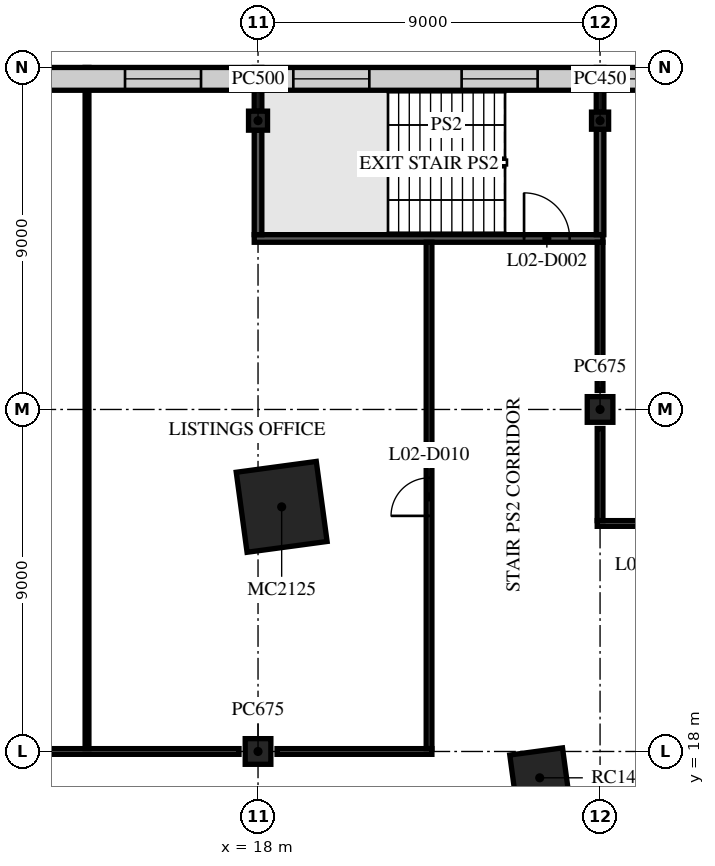
"""IFC4 building model, lengths in metres.
Left out: names, types, materials, properties, quantities, classifications, styles, units other than length and angle.
Written with IfcOpenShell. Run it as: python <this file> out.ifc"""

import sys

from ifc_helpers import new_model, si_unit, direction, frame, frame_2d, origin, origin_2d, place, context, subcontext, project, spatial, rectangle, extrude, element, fill, save


model = new_model("IFC4")
c1 = context("Model", 3, precision=1e-05, world=origin(), true_north=direction((0.0, 1.0)))
c2 = subcontext(c1, "Body", "Model", "MODEL_VIEW")
j1 = project(units=[si_unit("LENGTHUNIT", "METRE"), si_unit("PLANEANGLEUNIT", "RADIAN")], contexts=[c1])
p1 = place(None, origin())
s1 = spatial("IfcSite", under=j1, at=p1, CompositionType="ELEMENT")
p2 = place(p1, origin())
s2 = spatial("IfcBuilding", under=s1, at=p2, CompositionType="ELEMENT")
p3 = place(p2, frame((0.0, 0.0, 9.0)))
s3 = spatial("IfcBuildingStorey", under=s2, at=p3, CompositionType="ELEMENT", Elevation=9.0)
p4 = place(p3, frame((18.0, 18.0, 0.0), z_axis=(0.0, 0.0, 1.0), x_axis=(1.0, 0.0, 0.0)))
e1 = element("IfcColumn", 1, at=p4, inside=s3, PredefinedType="COLUMN", context=c2, shape_type="SweptSolid", body=[
    extrude(rectangle(XDim=0.675, YDim=0.675, at=origin_2d()), origin(), (0.0, 0.0, 1.0), 4.5),
])
p5 = place(p3, frame((18.0, 34.6, 0.0), z_axis=(0.0, 0.0, 1.0), x_axis=(1.0, 0.0, 0.0)))
e2 = element("IfcColumn", 2, at=p5, inside=s3, PredefinedType="COLUMN", context=c2, shape_type="SweptSolid", body=[
    extrude(rectangle(XDim=0.5, YDim=0.5, at=origin_2d()), origin(), (0.0, 0.0, 1.0), 4.5),
])
p6 = place(p3, frame((27.0, 27.0, 0.0), z_axis=(0.0, 0.0, 1.0), x_axis=(1.0, 0.0, 0.0)))
e3 = element("IfcColumn", 3, at=p6, inside=s3, PredefinedType="COLUMN", context=c2, shape_type="SweptSolid", body=[
    extrude(rectangle(XDim=0.675, YDim=0.675, at=origin_2d()), origin(), (0.0, 0.0, 1.0), 4.5),
])
p7 = place(p3, frame((27.0, 34.6, 0.0), z_axis=(0.0, 0.0, 1.0), x_axis=(1.0, 0.0, 0.0)))
e4 = element("IfcColumn", 4, at=p7, inside=s3, PredefinedType="COLUMN", context=c2, shape_type="SweptSolid", body=[
    extrude(rectangle(XDim=0.45, YDim=0.45, at=origin_2d()), origin(), (0.0, 0.0, 1.0), 4.5),
])
p8 = place(p3, frame((18.622, 24.437, 0.0), z_axis=(0.0, 0.0, 1.0), x_axis=(0.991001197216, 0.133853005627, 0.0)))
e5 = element("IfcColumn", 5, at=p8, inside=s3, PredefinedType="COLUMN", context=c2, shape_type="SweptSolid", body=[
    extrude(rectangle(XDim=2.125, YDim=2.125, at=origin_2d()), origin(), (0.0, 0.0, 1.0), 4.5),
])
p9 = place(p3, frame((25.412, 17.307, 0.0), z_axis=(0.0, 0.0, 1.0), x_axis=(0.991001197216, 0.133853005627, 0.0)))
e6 = element("IfcColumn", 6, at=p9, inside=s3, PredefinedType="COLUMN", context=c2, shape_type="SweptSolid", body=[
    extrude(rectangle(XDim=1.4, YDim=1.4, at=origin_2d()), origin(), (0.0, 0.0, 1.0), 4.5),
])
p10 = place(p3, frame((9.5, 18.0, 0.0), z_axis=(0.0, 0.0, 1.0), x_axis=(1.0, 0.0, 0.0)))
e7 = element("IfcWall", 7, at=p10, inside=s3, PredefinedType="PARTITIONING", context=c2, shape_type="SweptSolid", body=[
    extrude(rectangle(XDim=8.0, YDim=0.15, at=frame_2d((4.0, 0.0))), origin(), (0.0, 0.0, 1.0), 4.1),
])
p11 = place(p3, frame((18.5, 18.0, 0.0), z_axis=(0.0, 0.0, 1.0), x_axis=(1.0, 0.0, 0.0)))
e8 = element("IfcWall", 8, at=p11, inside=s3, PredefinedType="PARTITIONING", context=c2, shape_type="SweptSolid", body=[
    extrude(rectangle(XDim=4.075, YDim=0.15, at=frame_2d((2.038, 0.0))), origin(), (0.0, 0.0, 1.0), 4.1),
])
p12 = place(p3, frame((26.925, 24.0, 0.0), z_axis=(0.0, 0.0, 1.0), x_axis=(1.0, 0.0, 0.0)))
e9 = element("IfcWall", 9, at=p12, inside=s3, PredefinedType="PARTITIONING", context=c2, shape_type="SweptSolid", body=[
    extrude(rectangle(XDim=9.075, YDim=0.15, at=frame_2d((4.538, 0.0))), origin(), (0.0, 0.0, 1.0), 4.1),
])
p13 = place(p12, frame((1.075, 0.0, 0.0)))
e10 = element("IfcOpeningElement", 10, at=p13, cuts=e9, PredefinedType="OPENING", context=c2, shape_type="SweptSolid", body=[
    extrude(rectangle(XDim=0.9, YDim=2.1, at=frame_2d((0.45, 1.05))), frame((0.0, 0.085, 0.0), z_axis=(0.0, -1.0, 0.0), x_axis=(1.0, 0.0, 0.0)), (0.0, 0.0, 1.0), 0.17),
])
p14 = place(p12, frame((4.075, 0.0, 0.0)))
e11 = element("IfcOpeningElement", 11, at=p14, cuts=e9, PredefinedType="OPENING", context=c2, shape_type="SweptSolid", body=[
    extrude(rectangle(XDim=0.9, YDim=2.1, at=frame_2d((0.45, 1.05))), frame((0.0, 0.085, 0.0), z_axis=(0.0, -1.0, 0.0), x_axis=(1.0, 0.0, 0.0)), (0.0, 0.0, 1.0), 0.17),
])
p15 = place(p12, frame((7.075, 0.0, 0.0)))
e12 = element("IfcOpeningElement", 12, at=p15, cuts=e9, PredefinedType="OPENING", context=c2, shape_type="SweptSolid", body=[
    extrude(rectangle(XDim=0.9, YDim=2.1, at=frame_2d((0.45, 1.05))), frame((0.0, 0.085, 0.0), z_axis=(0.0, -1.0, 0.0), x_axis=(1.0, 0.0, 0.0)), (0.0, 0.0, 1.0), 0.17),
])
p16 = place(p3, frame((17.9, 31.5, 0.0), z_axis=(0.0, 0.0, 1.0), x_axis=(1.0, 0.0, 0.0)))
e13 = element("IfcWall", 13, at=p16, inside=s3, PredefinedType="PARTITIONING", context=c2, shape_type="SweptSolid", body=[
    extrude(rectangle(XDim=9.175, YDim=0.2, at=frame_2d((4.587, 0.0))), origin(), (0.0, 0.0, 1.0), 4.1),
])
p17 = place(p16, frame((7.1, 0.0, 0.0)))
e14 = element("IfcOpeningElement", 14, at=p17, cuts=e13, PredefinedType="OPENING", context=c2, shape_type="SweptSolid", body=[
    extrude(rectangle(XDim=1.2, YDim=2.1, at=frame_2d((0.6, 1.05))), frame((0.0, 0.11, 0.0), z_axis=(0.0, -1.0, 0.0), x_axis=(1.0, 0.0, 0.0)), (0.0, 0.0, 1.0), 0.22),
])
p18 = place(p3, frame((13.5, 18.075, 0.0), z_axis=(0.0, 0.0, 1.0), x_axis=(0.0, 1.0, 0.0)))
e15 = element("IfcWall", 15, at=p18, inside=s3, PredefinedType="PARTITIONING", context=c2, shape_type="SweptSolid", body=[
    extrude(rectangle(XDim=17.925, YDim=0.1, at=frame_2d((8.962, 0.0))), origin(), (0.0, 0.0, 1.0), 4.1),
])
p19 = place(p3, frame((18.0, 31.6, 0.0), z_axis=(0.0, 0.0, 1.0), x_axis=(0.0, 1.0, 0.0)))
e16 = element("IfcWall", 16, at=p19, inside=s3, PredefinedType="PARTITIONING", context=c2, shape_type="SweptSolid", body=[
    extrude(rectangle(XDim=2.75, YDim=0.2, at=frame_2d((1.375, 0.0))), origin(), (0.0, 0.0, 1.0), 4.1),
])
p20 = place(p3, frame((18.0, 34.85, 0.0), z_axis=(0.0, 0.0, 1.0), x_axis=(0.0, 1.0, 0.0)))
e17 = element("IfcWall", 17, at=p20, inside=s3, PredefinedType="PARTITIONING", context=c2, shape_type="SweptSolid", body=[
    extrude(rectangle(XDim=1.15, YDim=0.2, at=frame_2d((0.575, 0.0))), origin(), (0.0, 0.0, 1.0), 4.1),
])
p21 = place(p3, frame((22.5, 18.075, 0.0), z_axis=(0.0, 0.0, 1.0), x_axis=(0.0, 1.0, 0.0)))
e18 = element("IfcWall", 18, at=p21, inside=s3, PredefinedType="PARTITIONING", context=c2, shape_type="SweptSolid", body=[
    extrude(rectangle(XDim=13.325, YDim=0.15, at=frame_2d((6.663, 0.0))), origin(), (0.0, 0.0, 1.0), 4.1),
])
p22 = place(p21, frame((6.125, 0.0, 0.0)))
e19 = element("IfcOpeningElement", 19, at=p22, cuts=e18, PredefinedType="OPENING", context=c2, shape_type="SweptSolid", body=[
    extrude(rectangle(XDim=1.0, YDim=2.1, at=frame_2d((0.5, 1.05))), frame((0.0, 0.085, 0.0), z_axis=(0.0, -1.0, 0.0), x_axis=(1.0, 0.0, 0.0)), (0.0, 0.0, 1.0), 0.17),
])
p23 = place(p3, frame((27.0, 24.075, 0.0), z_axis=(0.0, 0.0, 1.0), x_axis=(0.0, 1.0, 0.0)))
e20 = element("IfcWall", 20, at=p23, inside=s3, PredefinedType="PARTITIONING", context=c2, shape_type="SweptSolid", body=[
    extrude(rectangle(XDim=2.425, YDim=0.15, at=frame_2d((1.212, 0.0))), origin(), (0.0, 0.0, 1.0), 4.1),
])
p24 = place(p3, frame((27.0, 27.5, 0.0), z_axis=(0.0, 0.0, 1.0), x_axis=(0.0, 1.0, 0.0)))
e21 = element("IfcWall", 21, at=p24, inside=s3, PredefinedType="PARTITIONING", context=c2, shape_type="SweptSolid", body=[
    extrude(rectangle(XDim=3.9, YDim=0.15, at=frame_2d((1.95, 0.0))), origin(), (0.0, 0.0, 1.0), 4.1),
])
p25 = place(p3, frame((27.0, 31.6, 0.0), z_axis=(0.0, 0.0, 1.0), x_axis=(0.0, 1.0, 0.0)))
e22 = element("IfcWall", 22, at=p25, inside=s3, PredefinedType="PARTITIONING", context=c2, shape_type="SweptSolid", body=[
    extrude(rectangle(XDim=2.775, YDim=0.2, at=frame_2d((1.387, 0.0))), origin(), (0.0, 0.0, 1.0), 4.1),
])
p26 = place(p3, frame((27.0, 34.825, 0.0), z_axis=(0.0, 0.0, 1.0), x_axis=(0.0, 1.0, 0.0)))
e23 = element("IfcWall", 23, at=p26, inside=s3, PredefinedType="PARTITIONING", context=c2, shape_type="SweptSolid", body=[
    extrude(rectangle(XDim=1.175, YDim=0.2, at=frame_2d((0.587, 0.0))), origin(), (0.0, 0.0, 1.0), 4.1),
])
p27 = place(p3, frame((30.876, 35.7, 0.0), z_axis=(0.0, 0.0, 1.0), x_axis=(-1.0, 0.0, 0.0)))
e24 = element("IfcWall", 24, at=p27, inside=s3, PredefinedType="STANDARD", context=c2, shape_type="SweptSolid", body=[
    extrude(rectangle(XDim=61.751, YDim=0.6, at=frame_2d((30.876, 0.0))), origin(), (0.0, 0.0, 1.0), 4.1),
])
p28 = place(p27, frame((1.152, 0.0, 0.9)))
e25 = element("IfcOpeningElement", 25, at=p28, cuts=e24, PredefinedType="OPENING", context=c2, shape_type="SweptSolid", body=[
    extrude(rectangle(XDim=2.0, YDim=3.0, at=frame_2d((1.0, 1.5))), frame((0.0, 0.31, 0.0), z_axis=(0.0, -1.0, 0.0), x_axis=(1.0, 0.0, 0.0)), (0.0, 0.0, 1.0), 0.62),
])
p29 = place(p27, frame((5.519, 0.0, 0.9)))
e26 = element("IfcOpeningElement", 26, at=p29, cuts=e24, PredefinedType="OPENING", context=c2, shape_type="SweptSolid", body=[
    extrude(rectangle(XDim=2.0, YDim=3.0, at=frame_2d((1.0, 1.5))), frame((0.0, 0.31, 0.0), z_axis=(0.0, -1.0, 0.0), x_axis=(1.0, 0.0, 0.0)), (0.0, 0.0, 1.0), 0.62),
])
p30 = place(p27, frame((9.947, 0.0, 0.9)))
e27 = element("IfcOpeningElement", 27, at=p30, cuts=e24, PredefinedType="OPENING", context=c2, shape_type="SweptSolid", body=[
    extrude(rectangle(XDim=2.0, YDim=3.0, at=frame_2d((1.0, 1.5))), frame((0.0, 0.31, 0.0), z_axis=(0.0, -1.0, 0.0), x_axis=(1.0, 0.0, 0.0)), (0.0, 0.0, 1.0), 0.62),
])
p31 = place(p27, frame((14.376, 0.0, 0.9)))
e28 = element("IfcOpeningElement", 28, at=p31, cuts=e24, PredefinedType="OPENING", context=c2, shape_type="SweptSolid", body=[
    extrude(rectangle(XDim=2.0, YDim=3.0, at=frame_2d((1.0, 1.5))), frame((0.0, 0.31, 0.0), z_axis=(0.0, -1.0, 0.0), x_axis=(1.0, 0.0, 0.0)), (0.0, 0.0, 1.0), 0.62),
])
p32 = place(p27, frame((18.804, 0.0, 0.9)))
e29 = element("IfcOpeningElement", 29, at=p32, cuts=e24, PredefinedType="OPENING", context=c2, shape_type="SweptSolid", body=[
    extrude(rectangle(XDim=2.0, YDim=3.0, at=frame_2d((1.0, 1.5))), frame((0.0, 0.31, 0.0), z_axis=(0.0, -1.0, 0.0), x_axis=(1.0, 0.0, 0.0)), (0.0, 0.0, 1.0), 0.62),
])
p33 = place(p27, frame((23.233, 0.0, 0.9)))
e30 = element("IfcOpeningElement", 30, at=p33, cuts=e24, PredefinedType="OPENING", context=c2, shape_type="SweptSolid", body=[
    extrude(rectangle(XDim=2.0, YDim=3.0, at=frame_2d((1.0, 1.5))), frame((0.0, 0.31, 0.0), z_axis=(0.0, -1.0, 0.0), x_axis=(1.0, 0.0, 0.0)), (0.0, 0.0, 1.0), 0.62),
])
p34 = place(p27, frame((27.662, 0.0, 0.9)))
e31 = element("IfcOpeningElement", 31, at=p34, cuts=e24, PredefinedType="OPENING", context=c2, shape_type="SweptSolid", body=[
    extrude(rectangle(XDim=2.0, YDim=3.0, at=frame_2d((1.0, 1.5))), frame((0.0, 0.31, 0.0), z_axis=(0.0, -1.0, 0.0), x_axis=(1.0, 0.0, 0.0)), (0.0, 0.0, 1.0), 0.62),
])
p35 = place(p27, frame((32.09, 0.0, 0.9)))
e32 = element("IfcOpeningElement", 32, at=p35, cuts=e24, PredefinedType="OPENING", context=c2, shape_type="SweptSolid", body=[
    extrude(rectangle(XDim=2.0, YDim=3.0, at=frame_2d((1.0, 1.5))), frame((0.0, 0.31, 0.0), z_axis=(0.0, -1.0, 0.0), x_axis=(1.0, 0.0, 0.0)), (0.0, 0.0, 1.0), 0.62),
])
p36 = place(p27, frame((36.519, 0.0, 0.9)))
e33 = element("IfcOpeningElement", 33, at=p36, cuts=e24, PredefinedType="OPENING", context=c2, shape_type="SweptSolid", body=[
    extrude(rectangle(XDim=2.0, YDim=3.0, at=frame_2d((1.0, 1.5))), frame((0.0, 0.31, 0.0), z_axis=(0.0, -1.0, 0.0), x_axis=(1.0, 0.0, 0.0)), (0.0, 0.0, 1.0), 0.62),
])
p37 = place(p27, frame((40.947, 0.0, 0.9)))
e34 = element("IfcOpeningElement", 34, at=p37, cuts=e24, PredefinedType="OPENING", context=c2, shape_type="SweptSolid", body=[
    extrude(rectangle(XDim=2.0, YDim=3.0, at=frame_2d((1.0, 1.5))), frame((0.0, 0.31, 0.0), z_axis=(0.0, -1.0, 0.0), x_axis=(1.0, 0.0, 0.0)), (0.0, 0.0, 1.0), 0.62),
])
p38 = place(p27, frame((45.376, 0.0, 0.9)))
e35 = element("IfcOpeningElement", 35, at=p38, cuts=e24, PredefinedType="OPENING", context=c2, shape_type="SweptSolid", body=[
    extrude(rectangle(XDim=2.0, YDim=3.0, at=frame_2d((1.0, 1.5))), frame((0.0, 0.31, 0.0), z_axis=(0.0, -1.0, 0.0), x_axis=(1.0, 0.0, 0.0)), (0.0, 0.0, 1.0), 0.62),
])
p39 = place(p27, frame((49.804, 0.0, 0.9)))
e36 = element("IfcOpeningElement", 36, at=p39, cuts=e24, PredefinedType="OPENING", context=c2, shape_type="SweptSolid", body=[
    extrude(rectangle(XDim=2.0, YDim=3.0, at=frame_2d((1.0, 1.5))), frame((0.0, 0.31, 0.0), z_axis=(0.0, -1.0, 0.0), x_axis=(1.0, 0.0, 0.0)), (0.0, 0.0, 1.0), 0.62),
])
p40 = place(p27, frame((54.233, 0.0, 0.9)))
e37 = element("IfcOpeningElement", 37, at=p40, cuts=e24, PredefinedType="OPENING", context=c2, shape_type="SweptSolid", body=[
    extrude(rectangle(XDim=2.0, YDim=3.0, at=frame_2d((1.0, 1.5))), frame((0.0, 0.31, 0.0), z_axis=(0.0, -1.0, 0.0), x_axis=(1.0, 0.0, 0.0)), (0.0, 0.0, 1.0), 0.62),
])
p41 = place(p27, frame((58.599, 0.0, 0.9)))
e38 = element("IfcOpeningElement", 38, at=p41, cuts=e24, PredefinedType="OPENING", context=c2, shape_type="SweptSolid", body=[
    extrude(rectangle(XDim=2.0, YDim=3.0, at=frame_2d((1.0, 1.5))), frame((0.0, 0.31, 0.0), z_axis=(0.0, -1.0, 0.0), x_axis=(1.0, 0.0, 0.0)), (0.0, 0.0, 1.0), 0.62),
])
p42 = place(p17, origin())
e39 = element("IfcDoor", 39, at=p42, inside=s3, OperationType="SINGLE_SWING_RIGHT", PredefinedType="DOOR", context=c2, shape_type="SweptSolid", body=[
    extrude(rectangle(XDim=1.2, YDim=2.1, at=frame_2d((0.6, 1.05))), frame((0.0, 0.025, 0.0), z_axis=(0.0, -1.0, 0.0), x_axis=(1.0, 0.0, 0.0)), (0.0, 0.0, 1.0), 0.05),
])
fill(e14, e39)
p43 = place(p22, origin())
e40 = element("IfcDoor", 40, at=p43, inside=s3, OperationType="SINGLE_SWING_RIGHT", PredefinedType="DOOR", context=c2, shape_type="SweptSolid", body=[
    extrude(rectangle(XDim=1.0, YDim=2.1, at=frame_2d((0.5, 1.05))), frame((0.0, 0.025, 0.0), z_axis=(0.0, -1.0, 0.0), x_axis=(1.0, 0.0, 0.0)), (0.0, 0.0, 1.0), 0.05),
])
fill(e19, e40)
p44 = place(p28, origin())
e41 = element("IfcWindow", 41, at=p44, inside=s3, PartitioningType="SINGLE_PANEL", PredefinedType="WINDOW", context=c2, shape_type="SweptSolid", body=[
    extrude(rectangle(XDim=2.0, YDim=3.0, at=frame_2d((1.0, 1.5))), frame((0.0, 0.03, 0.0), z_axis=(0.0, -1.0, 0.0), x_axis=(1.0, 0.0, 0.0)), (0.0, 0.0, 1.0), 0.06),
])
fill(e25, e41)
p45 = place(p29, origin())
e42 = element("IfcWindow", 42, at=p45, inside=s3, PartitioningType="SINGLE_PANEL", PredefinedType="WINDOW", context=c2, shape_type="SweptSolid", body=[
    extrude(rectangle(XDim=2.0, YDim=3.0, at=frame_2d((1.0, 1.5))), frame((0.0, 0.03, 0.0), z_axis=(0.0, -1.0, 0.0), x_axis=(1.0, 0.0, 0.0)), (0.0, 0.0, 1.0), 0.06),
])
fill(e26, e42)
p46 = place(p30, origin())
e43 = element("IfcWindow", 43, at=p46, inside=s3, PartitioningType="SINGLE_PANEL", PredefinedType="WINDOW", context=c2, shape_type="SweptSolid", body=[
    extrude(rectangle(XDim=2.0, YDim=3.0, at=frame_2d((1.0, 1.5))), frame((0.0, 0.03, 0.0), z_axis=(0.0, -1.0, 0.0), x_axis=(1.0, 0.0, 0.0)), (0.0, 0.0, 1.0), 0.06),
])
fill(e27, e43)
p47 = place(p31, origin())
e44 = element("IfcWindow", 44, at=p47, inside=s3, PartitioningType="SINGLE_PANEL", PredefinedType="WINDOW", context=c2, shape_type="SweptSolid", body=[
    extrude(rectangle(XDim=2.0, YDim=3.0, at=frame_2d((1.0, 1.5))), frame((0.0, 0.03, 0.0), z_axis=(0.0, -1.0, 0.0), x_axis=(1.0, 0.0, 0.0)), (0.0, 0.0, 1.0), 0.06),
])
fill(e28, e44)
save(model, sys.argv[1])
